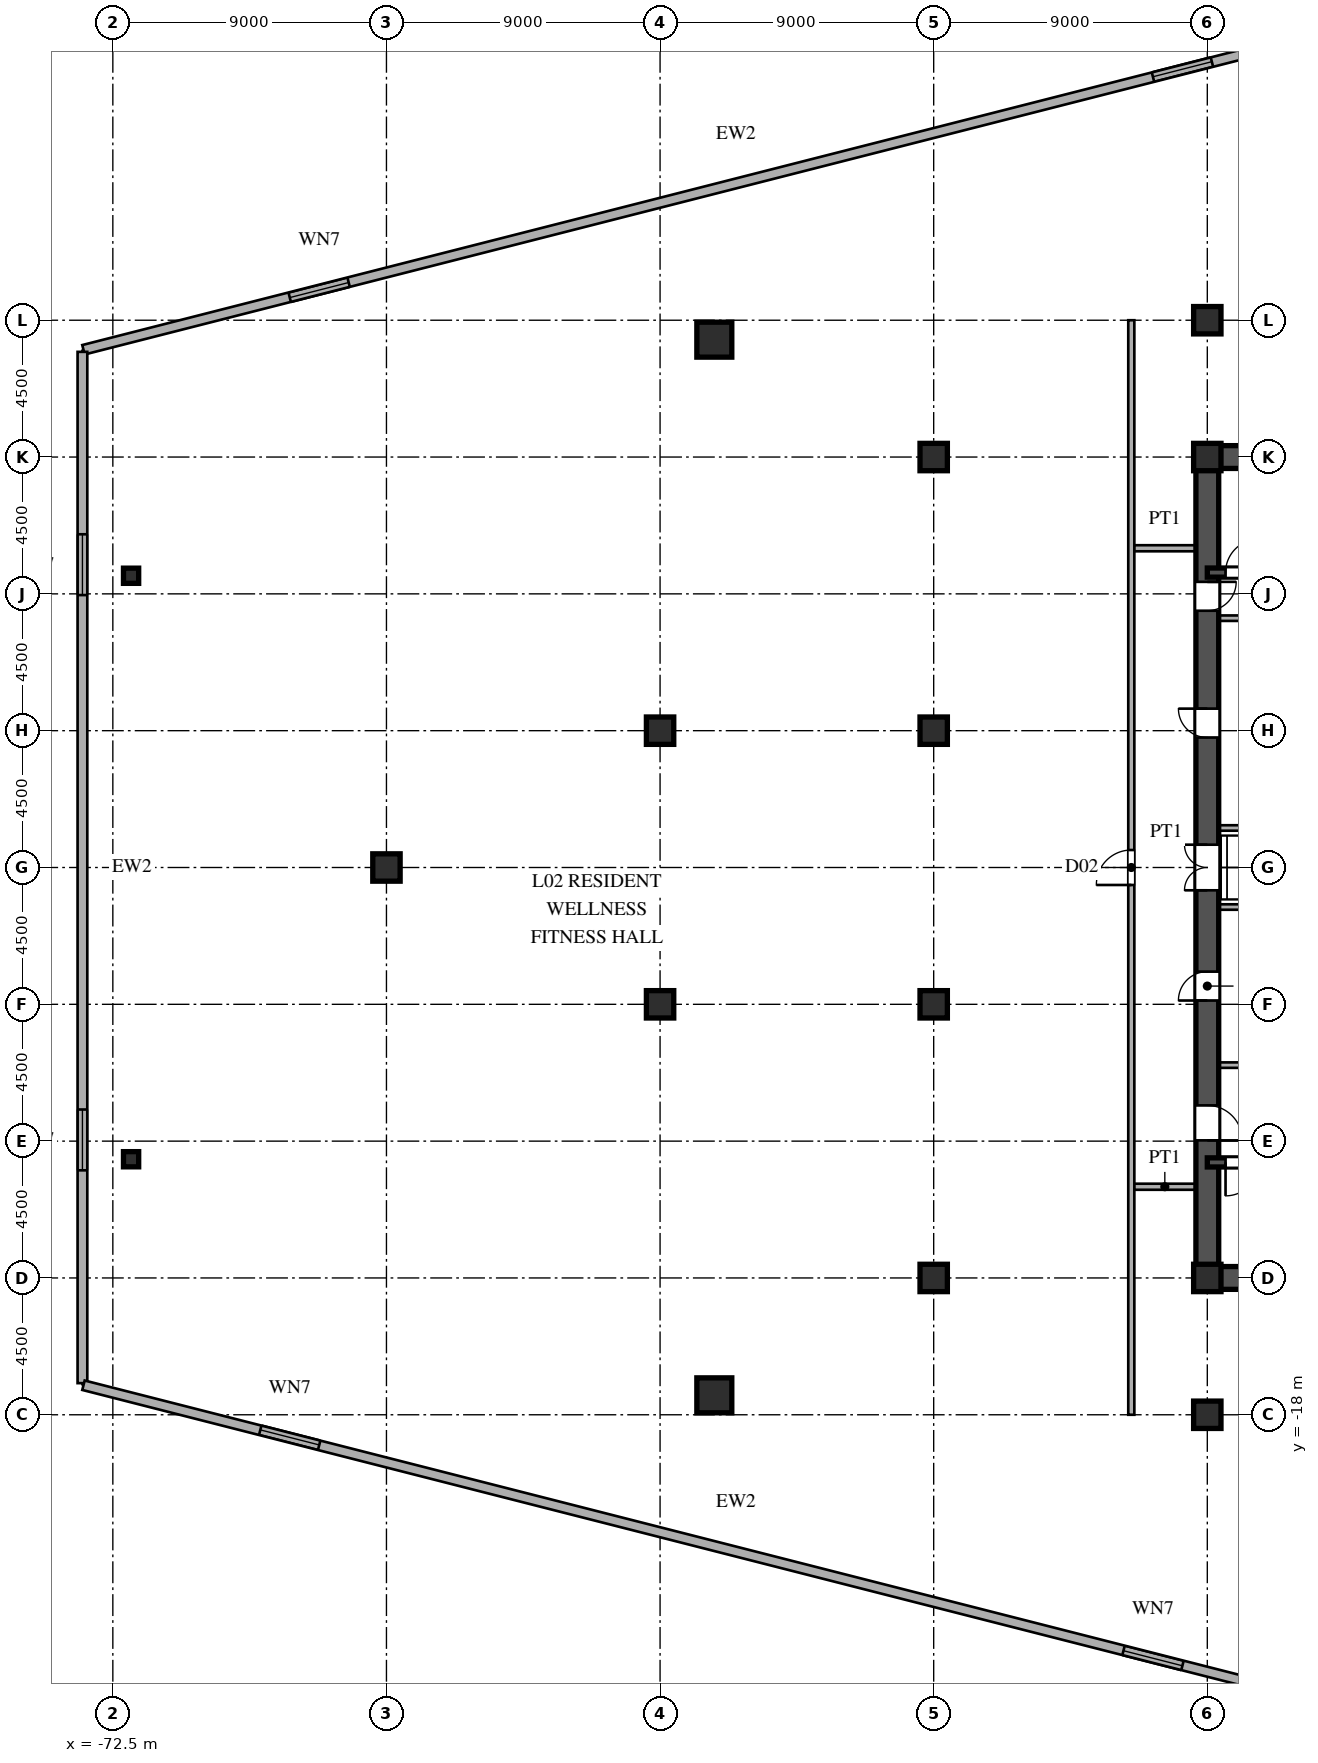
"""IFC4 building model, lengths in metres.
Left out: names, types, materials, properties, quantities, classifications, styles, units other than length and angle.
Written with IfcOpenShell. Run it as: python <this file> out.ifc"""

import sys

from ifc_helpers import new_model, si_unit, direction, frame, frame_2d, origin, origin_2d, place, context, subcontext, project, spatial, rectangle, hollow_rectangle, i_section, extrude, source, transform, mapped, element, fill, save


model = new_model("IFC4")
c1 = context("Model", 3, precision=1e-05, world=origin(), true_north=direction((0.0, 1.0)))
c2 = subcontext(c1, "Body", "Model", "MODEL_VIEW")
j1 = project(units=[si_unit("LENGTHUNIT", "METRE"), si_unit("PLANEANGLEUNIT", "RADIAN")], contexts=[c1])
p1 = place(None, origin())
s1 = spatial("IfcSite", under=j1, at=p1, CompositionType="ELEMENT")
p2 = place(p1, origin())
s2 = spatial("IfcBuilding", under=s1, at=p2, CompositionType="ELEMENT")
p3 = place(p2, frame((0.0, 0.0, 9.9)))
s3 = spatial("IfcBuildingStorey", under=s2, at=p3, CompositionType="ELEMENT", Elevation=9.9)
m1 = source(origin(), c2, "Body", "SweptSolid", [
    extrude(i_section(OverallWidth=0.9, OverallDepth=0.9, WebThickness=0.036, FlangeThickness=0.055, at=origin_2d()), origin(), (0.0, 0.0, 1.0), 4.5),
])
for number, where, z_axis, x_axis in (
    (1, (-36.5, -18.0, 0.0), (0.0, 0.0, 1.0), (1.0, 0.0, 0.0)),
    (2, (-36.5, -13.5, 0.0), (0.0, 0.0, 1.0), (1.0, 0.0, 0.0)),
    (3, (-36.5, 13.5, 0.0), (0.0, 0.0, 1.0), (1.0, 0.0, 0.0)),
    (4, (-36.5, 18.0, 0.0), (0.0, 0.0, 1.0), (1.0, 0.0, 0.0)),
    (5, (-45.5, -13.5, 0.0), (0.0, 0.0, 1.0), (1.0, 0.0, 0.0)),
    (6, (-45.5, -4.5, 0.0), (0.0, 0.0, 1.0), (1.0, 0.0, 0.0)),
    (7, (-45.5, 4.5, 0.0), (0.0, 0.0, 1.0), (1.0, 0.0, 0.0)),
    (8, (-45.5, 13.5, 0.0), (0.0, 0.0, 1.0), (1.0, 0.0, 0.0)),
    (9, (-54.5, -4.5, 0.0), (0.0, 0.0, 1.0), (1.0, 0.0, 0.0)),
    (10, (-54.5, 4.5, 0.0), (0.0, 0.0, 1.0), (1.0, 0.0, 0.0)),
    (11, (-63.5, 0.0, 0.0), (0.0, 0.0, 1.0), (1.0, 0.0, 0.0)),
):
    element("IfcColumn", number, at=place(p3, frame(where, z_axis=z_axis, x_axis=x_axis)), inside=s3, PredefinedType="COLUMN", context=c2, shape_type="MappedRepresentation", body=[
        mapped(m1, transform((0.0, 0.0, 0.0), scale=1.0)),
    ])
m2 = source(origin(), c2, "Body", "SweptSolid", [
    extrude(hollow_rectangle(XDim=0.5, YDim=0.5, WallThickness=0.02, at=origin_2d()), origin(), (0.0, 0.0, 1.0), 4.5),
])
for number, where, z_axis, x_axis in (
    (12, (-71.9, 9.596, 0.0), (0.0, 0.0, 1.0), (1.0, 0.0, 0.0)),
    (13, (-71.9, -9.596, 0.0), (0.0, 0.0, 1.0), (1.0, 0.0, 0.0)),
):
    element("IfcColumn", number, at=place(p3, frame(where, z_axis=z_axis, x_axis=x_axis)), inside=s3, PredefinedType="COLUMN", context=c2, shape_type="MappedRepresentation", body=[
        mapped(m2, transform((0.0, 0.0, 0.0), scale=1.0)),
    ])
m3 = source(origin(), c2, "Body", "SweptSolid", [
    extrude(hollow_rectangle(XDim=1.15, YDim=1.15, WallThickness=0.048, at=origin_2d()), origin(), (0.0, 0.0, 1.0), 4.5),
])
for number, where, z_axis, x_axis in (
    (14, (-52.716, -17.361, 0.0), (0.0, 0.0, 1.0), (1.0, 0.0, 0.0)),
    (15, (-52.716, 17.361, 0.0), (0.0, 0.0, 1.0), (1.0, 0.0, 0.0)),
):
    element("IfcColumn", number, at=place(p3, frame(where, z_axis=z_axis, x_axis=x_axis)), inside=s3, PredefinedType="COLUMN", context=c2, shape_type="MappedRepresentation", body=[
        mapped(m3, transform((0.0, 0.0, 0.0), scale=1.0)),
    ])
p4 = place(p3, frame((-73.461, -17.01, 0.0), z_axis=(0.0, 0.0, 1.0), x_axis=(0.968803566014, -0.247829882134, 0.0)))
e16 = element("IfcWall", 16, at=p4, inside=s3, PredefinedType="SOLIDWALL", context=c2, shape_type="SweptSolid", body=[
    extrude(rectangle(XDim=44.304, YDim=0.32, at=frame_2d((22.152, 0.0))), origin(), (0.0, 0.0, 1.0), 4.22),
])
p5 = place(p4, frame((6.0, 0.0, 0.85)))
e17 = element("IfcOpeningElement", 17, at=p5, cuts=e16, PredefinedType="OPENING", context=c2, shape_type="SweptSolid", body=[
    extrude(rectangle(XDim=2.0, YDim=1.95, at=frame_2d((1.0, 0.975))), frame((0.0, 0.17, 0.0), z_axis=(0.0, -1.0, 0.0), x_axis=(1.0, 0.0, 0.0)), (0.0, 0.0, 1.0), 0.34),
])
p6 = place(p4, frame((35.305, 0.0, 0.85)))
e18 = element("IfcOpeningElement", 18, at=p6, cuts=e16, PredefinedType="OPENING", context=c2, shape_type="SweptSolid", body=[
    extrude(rectangle(XDim=2.0, YDim=1.95, at=frame_2d((1.0, 0.975))), frame((0.0, 0.17, 0.0), z_axis=(0.0, -1.0, 0.0), x_axis=(1.0, 0.0, 0.0)), (0.0, 0.0, 1.0), 0.34),
])
p7 = place(p3, frame((-30.539, 27.99, 0.0), z_axis=(0.0, 0.0, 1.0), x_axis=(-0.968803566014, -0.247829882134, 0.0)))
e19 = element("IfcWall", 19, at=p7, inside=s3, PredefinedType="SOLIDWALL", context=c2, shape_type="SweptSolid", body=[
    extrude(rectangle(XDim=44.304, YDim=0.32, at=frame_2d((22.152, 0.0))), origin(), (0.0, 0.0, 1.0), 4.22),
])
p8 = place(p7, frame((6.0, 0.0, 0.85)))
e20 = element("IfcOpeningElement", 20, at=p8, cuts=e19, PredefinedType="OPENING", context=c2, shape_type="SweptSolid", body=[
    extrude(rectangle(XDim=2.0, YDim=1.95, at=frame_2d((1.0, 0.975))), frame((0.0, 0.17, 0.0), z_axis=(0.0, -1.0, 0.0), x_axis=(1.0, 0.0, 0.0)), (0.0, 0.0, 1.0), 0.34),
])
p9 = place(p7, frame((35.305, 0.0, 0.85)))
e21 = element("IfcOpeningElement", 21, at=p9, cuts=e19, PredefinedType="OPENING", context=c2, shape_type="SweptSolid", body=[
    extrude(rectangle(XDim=2.0, YDim=1.95, at=frame_2d((1.0, 0.975))), frame((0.0, 0.17, 0.0), z_axis=(0.0, -1.0, 0.0), x_axis=(1.0, 0.0, 0.0)), (0.0, 0.0, 1.0), 0.34),
])
p10 = place(p3, frame((-73.5, 16.96, 0.0), z_axis=(0.0, 0.0, 1.0), x_axis=(0.0, -1.0, 0.0)))
e22 = element("IfcWall", 22, at=p10, inside=s3, PredefinedType="SOLIDWALL", context=c2, shape_type="SweptSolid", body=[
    extrude(rectangle(XDim=33.92, YDim=0.32, at=frame_2d((16.96, 0.0))), origin(), (0.0, 0.0, 1.0), 4.22),
])
p11 = place(p10, frame((6.0, 0.0, 0.85)))
e23 = element("IfcOpeningElement", 23, at=p11, cuts=e22, PredefinedType="OPENING", context=c2, shape_type="SweptSolid", body=[
    extrude(rectangle(XDim=2.0, YDim=1.95, at=frame_2d((1.0, 0.975))), frame((0.0, 0.17, 0.0), z_axis=(0.0, -1.0, 0.0), x_axis=(1.0, 0.0, 0.0)), (0.0, 0.0, 1.0), 0.34),
])
p12 = place(p10, frame((24.92, 0.0, 0.85)))
e24 = element("IfcOpeningElement", 24, at=p12, cuts=e22, PredefinedType="OPENING", context=c2, shape_type="SweptSolid", body=[
    extrude(rectangle(XDim=2.0, YDim=1.95, at=frame_2d((1.0, 0.975))), frame((0.0, 0.17, 0.0), z_axis=(0.0, -1.0, 0.0), x_axis=(1.0, 0.0, 0.0)), (0.0, 0.0, 1.0), 0.34),
])
for number, where, z_axis, x_axis in (
    (25, (-36.5, -13.5, 0.0), (0.0, 0.0, 1.0), (1.0, 0.0, 0.0)),
    (26, (-36.5, 13.5, 0.0), (0.0, 0.0, 1.0), (1.0, 0.0, 0.0)),
):
    element("IfcWall", number, at=place(p3, frame(where, z_axis=z_axis, x_axis=x_axis)), inside=s3, PredefinedType="SHEAR", context=c2, shape_type="SweptSolid", body=[
        extrude(rectangle(XDim=9.0, YDim=0.75, at=frame_2d((4.5, 0.0))), origin(), (0.0, 0.0, 1.0), 4.22),
    ])
p13 = place(p3, frame((-36.5, -13.65, 0.0), z_axis=(0.0, 0.0, 1.0), x_axis=(0.0, 1.0, 0.0)))
e27 = element("IfcWall", 27, at=p13, inside=s3, PredefinedType="SHEAR", context=c2, shape_type="SweptSolid", body=[
    extrude(rectangle(XDim=7.15, YDim=0.75, at=frame_2d((3.575, 0.0))), origin(), (0.0, 0.0, 1.0), 4.22),
])
p14 = place(p13, frame((4.675, 0.0, 0.0)))
e28 = element("IfcOpeningElement", 28, at=p14, cuts=e27, PredefinedType="OPENING", context=c2, shape_type="SweptSolid", body=[
    extrude(rectangle(XDim=1.15, YDim=2.2, at=frame_2d((0.575, 1.1))), frame((0.0, 0.385, 0.0), z_axis=(0.0, -1.0, 0.0), x_axis=(1.0, 0.0, 0.0)), (0.0, 0.0, 1.0), 0.77),
])
p15 = place(p3, frame((-36.5, -1.3, 0.0), z_axis=(0.0, 0.0, 1.0), x_axis=(0.0, 1.0, 0.0)))
e29 = element("IfcWall", 29, at=p15, inside=s3, PredefinedType="SHEAR", context=c2, shape_type="SweptSolid", body=[
    extrude(rectangle(XDim=2.6, YDim=0.75, at=frame_2d((1.3, 0.0))), origin(), (0.0, 0.0, 1.0), 4.22),
])
p16 = place(p15, frame((0.55, 0.0, 0.0)))
e30 = element("IfcOpeningElement", 30, at=p16, cuts=e29, PredefinedType="OPENING", context=c2, shape_type="SweptSolid", body=[
    extrude(rectangle(XDim=1.5, YDim=2.3, at=frame_2d((0.75, 1.15))), frame((0.0, 0.385, 0.0), z_axis=(0.0, -1.0, 0.0), x_axis=(1.0, 0.0, 0.0)), (0.0, 0.0, 1.0), 0.77),
])
p17 = place(p3, frame((-36.5, 8.2, 0.0), z_axis=(0.0, 0.0, 1.0), x_axis=(0.0, 1.0, 0.0)))
e31 = element("IfcWall", 31, at=p17, inside=s3, PredefinedType="SHEAR", context=c2, shape_type="SweptSolid", body=[
    extrude(rectangle(XDim=5.45, YDim=0.75, at=frame_2d((2.725, 0.0))), origin(), (0.0, 0.0, 1.0), 4.22),
])
p18 = place(p17, frame((0.245, 0.0, 0.0)))
e32 = element("IfcOpeningElement", 32, at=p18, cuts=e31, PredefinedType="OPENING", context=c2, shape_type="SweptSolid", body=[
    extrude(rectangle(XDim=0.95, YDim=2.15, at=frame_2d((0.475, 1.075))), frame((0.0, 0.385, 0.0), z_axis=(0.0, -1.0, 0.0), x_axis=(1.0, 0.0, 0.0)), (0.0, 0.0, 1.0), 0.77),
])
p19 = place(p3, frame((-36.5, -6.5, 0.0), z_axis=(0.0, 0.0, 1.0), x_axis=(0.0, 1.0, 0.0)))
e33 = element("IfcWall", 33, at=p19, inside=s3, PredefinedType="SHEAR", context=c2, shape_type="SweptSolid", body=[
    extrude(rectangle(XDim=5.2, YDim=0.75, at=frame_2d((2.6, 0.0))), origin(), (0.0, 0.0, 1.0), 4.22),
])
p20 = place(p19, frame((2.125, 0.0, 0.0)))
e34 = element("IfcOpeningElement", 34, at=p20, cuts=e33, PredefinedType="OPENING", context=c2, shape_type="SweptSolid", body=[
    extrude(rectangle(XDim=0.95, YDim=2.15, at=frame_2d((0.475, 1.075))), frame((0.0, 0.385, 0.0), z_axis=(0.0, -1.0, 0.0), x_axis=(1.0, 0.0, 0.0)), (0.0, 0.0, 1.0), 0.77),
])
p21 = place(p3, frame((-36.5, 1.3, 0.0), z_axis=(0.0, 0.0, 1.0), x_axis=(0.0, 1.0, 0.0)))
e35 = element("IfcWall", 35, at=p21, inside=s3, PredefinedType="SHEAR", context=c2, shape_type="SweptSolid", body=[
    extrude(rectangle(XDim=6.9, YDim=0.75, at=frame_2d((3.45, 0.0))), origin(), (0.0, 0.0, 1.0), 4.22),
])
p22 = place(p21, frame((2.975, 0.0, 0.0)))
e36 = element("IfcOpeningElement", 36, at=p22, cuts=e35, PredefinedType="OPENING", context=c2, shape_type="SweptSolid", body=[
    extrude(rectangle(XDim=0.95, YDim=2.15, at=frame_2d((0.475, 1.075))), frame((0.0, 0.385, 0.0), z_axis=(0.0, -1.0, 0.0), x_axis=(1.0, 0.0, 0.0)), (0.0, 0.0, 1.0), 0.77),
])
p23 = place(p3, frame((-36.5, -9.7, 0.0), z_axis=(0.0, 0.0, 1.0), x_axis=(1.0, 0.0, 0.0)))
e37 = element("IfcWall", 37, at=p23, inside=s3, PredefinedType="SHEAR", context=c2, shape_type="SweptSolid", body=[
    extrude(rectangle(XDim=9.0, YDim=0.3, at=frame_2d((4.5, 0.0))), origin(), (0.0, 0.0, 1.0), 4.22),
])
p24 = place(p23, frame((0.6, 0.0, 0.0)))
e38 = element("IfcOpeningElement", 38, at=p24, cuts=e37, PredefinedType="OPENING", context=c2, shape_type="SweptSolid", body=[
    extrude(rectangle(XDim=1.1, YDim=2.2, at=frame_2d((0.55, 1.1))), frame((0.0, 0.16, 0.0), z_axis=(0.0, -1.0, 0.0), x_axis=(1.0, 0.0, 0.0)), (0.0, 0.0, 1.0), 0.32),
])
p25 = place(p3, frame((-36.5, 9.7, 0.0), z_axis=(0.0, 0.0, 1.0), x_axis=(1.0, 0.0, 0.0)))
e39 = element("IfcWall", 39, at=p25, inside=s3, PredefinedType="SHEAR", context=c2, shape_type="SweptSolid", body=[
    extrude(rectangle(XDim=9.0, YDim=0.3, at=frame_2d((4.5, 0.0))), origin(), (0.0, 0.0, 1.0), 4.22),
])
p26 = place(p25, frame((0.6, 0.0, 0.0)))
e40 = element("IfcOpeningElement", 40, at=p26, cuts=e39, PredefinedType="OPENING", context=c2, shape_type="SweptSolid", body=[
    extrude(rectangle(XDim=1.1, YDim=2.2, at=frame_2d((0.55, 1.1))), frame((0.0, 0.16, 0.0), z_axis=(0.0, -1.0, 0.0), x_axis=(1.0, 0.0, 0.0)), (0.0, 0.0, 1.0), 0.32),
])
for number, where, z_axis, x_axis in (
    (41, (-36.15, -6.5, 0.0), (0.0, 0.0, 1.0), (1.0, 0.0, 0.0)),
    (42, (-36.15, 8.2, 0.0), (0.0, 0.0, 1.0), (1.0, 0.0, 0.0)),
):
    element("IfcWall", number, at=place(p3, frame(where, z_axis=z_axis, x_axis=x_axis)), inside=s3, PredefinedType="PARTITIONING", context=c2, shape_type="SweptSolid", body=[
        extrude(rectangle(XDim=5.7, YDim=0.18, at=frame_2d((2.85, 0.0))), origin(), (0.0, 0.0, 1.0), 4.22),
    ])
for number, where, z_axis, x_axis in (
    (43, (-36.15, -1.3, 0.0), (0.0, 0.0, 1.0), (1.0, 0.0, 0.0)),
    (44, (-36.15, 1.3, 0.0), (0.0, 0.0, 1.0), (1.0, 0.0, 0.0)),
):
    element("IfcWall", number, at=place(p3, frame(where, z_axis=z_axis, x_axis=x_axis)), inside=s3, PredefinedType="PARTITIONING", context=c2, shape_type="SweptSolid", body=[
        extrude(rectangle(XDim=2.95, YDim=0.18, at=frame_2d((1.475, 0.0))), origin(), (0.0, 0.0, 1.0), 4.22),
    ])
for number, where, z_axis, x_axis in (
    (45, (-38.915, -10.5, 0.0), (0.0, 0.0, 1.0), (1.0, 0.0, 0.0)),
    (46, (-38.915, 10.5, 0.0), (0.0, 0.0, 1.0), (1.0, 0.0, 0.0)),
):
    element("IfcWall", number, at=place(p3, frame(where, z_axis=z_axis, x_axis=x_axis)), inside=s3, PredefinedType="PARTITIONING", context=c2, shape_type="SweptSolid", body=[
        extrude(rectangle(XDim=2.035, YDim=0.2, at=frame_2d((1.018, 0.0))), origin(), (0.0, 0.0, 1.0), 4.22),
    ])
p27 = place(p3, frame((-39.0, -18.0, 0.0), z_axis=(0.0, 0.0, 1.0), x_axis=(0.0, 1.0, 0.0)))
e47 = element("IfcWall", 47, at=p27, inside=s3, PredefinedType="PARTITIONING", context=c2, shape_type="SweptSolid", body=[
    extrude(rectangle(XDim=36.0, YDim=0.2, at=frame_2d((18.0, 0.0))), origin(), (0.0, 0.0, 1.0), 4.22),
])
p28 = place(p27, frame((17.425, 0.0, 0.0)))
e48 = element("IfcOpeningElement", 48, at=p28, cuts=e47, PredefinedType="OPENING", context=c2, shape_type="SweptSolid", body=[
    extrude(rectangle(XDim=1.15, YDim=2.2, at=frame_2d((0.575, 1.1))), frame((0.0, 0.11, 0.0), z_axis=(0.0, -1.0, 0.0), x_axis=(1.0, 0.0, 0.0)), (0.0, 0.0, 1.0), 0.22),
])
m4 = source(origin(), c2, "Body", "SweptSolid", [
    extrude(rectangle(XDim=2.0, YDim=1.95, at=frame_2d((1.0, 0.975))), frame((0.0, 0.03, 0.0), z_axis=(0.0, -1.0, 0.0), x_axis=(1.0, 0.0, 0.0)), (0.0, 0.0, 1.0), 0.06),
])
p29 = place(p5, origin())
e49 = element("IfcWindow", 49, at=p29, inside=s3, PartitioningType="SINGLE_PANEL", PredefinedType="WINDOW", context=c2, shape_type="MappedRepresentation", body=[
    mapped(m4, transform((0.0, 0.0, 0.0), scale=1.0)),
])
fill(e17, e49)
p30 = place(p6, origin())
e50 = element("IfcWindow", 50, at=p30, inside=s3, PartitioningType="SINGLE_PANEL", PredefinedType="WINDOW", context=c2, shape_type="MappedRepresentation", body=[
    mapped(m4, transform((0.0, 0.0, 0.0), scale=1.0)),
])
fill(e18, e50)
p31 = place(p8, origin())
e51 = element("IfcWindow", 51, at=p31, inside=s3, PartitioningType="SINGLE_PANEL", PredefinedType="WINDOW", context=c2, shape_type="MappedRepresentation", body=[
    mapped(m4, transform((0.0, 0.0, 0.0), scale=1.0)),
])
fill(e20, e51)
p32 = place(p9, origin())
e52 = element("IfcWindow", 52, at=p32, inside=s3, PartitioningType="SINGLE_PANEL", PredefinedType="WINDOW", context=c2, shape_type="MappedRepresentation", body=[
    mapped(m4, transform((0.0, 0.0, 0.0), scale=1.0)),
])
fill(e21, e52)
p33 = place(p11, origin())
e53 = element("IfcWindow", 53, at=p33, inside=s3, PartitioningType="SINGLE_PANEL", PredefinedType="WINDOW", context=c2, shape_type="MappedRepresentation", body=[
    mapped(m4, transform((0.0, 0.0, 0.0), scale=1.0)),
])
fill(e23, e53)
p34 = place(p12, origin())
e54 = element("IfcWindow", 54, at=p34, inside=s3, PartitioningType="SINGLE_PANEL", PredefinedType="WINDOW", context=c2, shape_type="MappedRepresentation", body=[
    mapped(m4, transform((0.0, 0.0, 0.0), scale=1.0)),
])
fill(e24, e54)
m5 = source(origin(), c2, "Body", "SweptSolid", [
    extrude(rectangle(XDim=1.15, YDim=2.2, at=frame_2d((0.575, 1.1))), frame((0.0, 0.025, 0.0), z_axis=(0.0, -1.0, 0.0), x_axis=(1.0, 0.0, 0.0)), (0.0, 0.0, 1.0), 0.05),
])
p35 = place(p14, frame((1.15, 0.0, 0.0), z_axis=(0.0, 0.0, 1.0), x_axis=(-1.0, 0.0, 0.0)))
e55 = element("IfcDoor", 55, at=p35, inside=s3, OperationType="SINGLE_SWING_LEFT", PredefinedType="DOOR", context=c2, shape_type="MappedRepresentation", body=[
    mapped(m5, transform((0.0, 0.0, 0.0), scale=1.0)),
])
fill(e28, e55)
m6 = source(origin(), c2, "Body", "SweptSolid", [
    extrude(rectangle(XDim=1.5, YDim=2.3, at=frame_2d((0.75, 1.15))), frame((0.0, 0.025, 0.0), z_axis=(0.0, -1.0, 0.0), x_axis=(1.0, 0.0, 0.0)), (0.0, 0.0, 1.0), 0.05),
])
p36 = place(p16, origin())
e56 = element("IfcDoor", 56, at=p36, inside=s3, OperationType="DOUBLE_SWING_LEFT", PredefinedType="DOOR", context=c2, shape_type="MappedRepresentation", body=[
    mapped(m6, transform((0.0, 0.0, 0.0), scale=1.0)),
])
fill(e30, e56)
m7 = source(origin(), c2, "Body", "SweptSolid", [
    extrude(rectangle(XDim=0.95, YDim=2.15, at=frame_2d((0.475, 1.075))), frame((0.0, 0.025, 0.0), z_axis=(0.0, -1.0, 0.0), x_axis=(1.0, 0.0, 0.0)), (0.0, 0.0, 1.0), 0.05),
])
p37 = place(p18, frame((0.95, 0.0, 0.0), z_axis=(0.0, 0.0, 1.0), x_axis=(-1.0, 0.0, 0.0)))
e57 = element("IfcDoor", 57, at=p37, inside=s3, OperationType="SINGLE_SWING_RIGHT", PredefinedType="DOOR", context=c2, shape_type="MappedRepresentation", body=[
    mapped(m7, transform((0.0, 0.0, 0.0), scale=1.0)),
])
fill(e32, e57)
p38 = place(p20, origin())
e58 = element("IfcDoor", 58, at=p38, inside=s3, OperationType="SINGLE_SWING_LEFT", PredefinedType="DOOR", context=c2, shape_type="MappedRepresentation", body=[
    mapped(m7, transform((0.0, 0.0, 0.0), scale=1.0)),
])
fill(e34, e58)
p39 = place(p22, origin())
e59 = element("IfcDoor", 59, at=p39, inside=s3, OperationType="SINGLE_SWING_RIGHT", PredefinedType="DOOR", context=c2, shape_type="MappedRepresentation", body=[
    mapped(m7, transform((0.0, 0.0, 0.0), scale=1.0)),
])
fill(e36, e59)
m8 = source(origin(), c2, "Body", "SweptSolid", [
    extrude(rectangle(XDim=1.1, YDim=2.2, at=frame_2d((0.55, 1.1))), frame((0.0, 0.025, 0.0), z_axis=(0.0, -1.0, 0.0), x_axis=(1.0, 0.0, 0.0)), (0.0, 0.0, 1.0), 0.05),
])
p40 = place(p24, frame((1.1, 0.0, 0.0), z_axis=(0.0, 0.0, 1.0), x_axis=(-1.0, 0.0, 0.0)))
e60 = element("IfcDoor", 60, at=p40, inside=s3, OperationType="SINGLE_SWING_LEFT", PredefinedType="DOOR", context=c2, shape_type="MappedRepresentation", body=[
    mapped(m8, transform((0.0, 0.0, 0.0), scale=1.0)),
])
fill(e38, e60)
p41 = place(p26, origin())
e61 = element("IfcDoor", 61, at=p41, inside=s3, OperationType="SINGLE_SWING_RIGHT", PredefinedType="DOOR", context=c2, shape_type="MappedRepresentation", body=[
    mapped(m8, transform((0.0, 0.0, 0.0), scale=1.0)),
])
fill(e40, e61)
p42 = place(p28, origin())
e62 = element("IfcDoor", 62, at=p42, inside=s3, OperationType="SINGLE_SWING_LEFT", PredefinedType="DOOR", context=c2, shape_type="MappedRepresentation", body=[
    mapped(m5, transform((0.0, 0.0, 0.0), scale=1.0)),
])
fill(e48, e62)
save(model, sys.argv[1])
